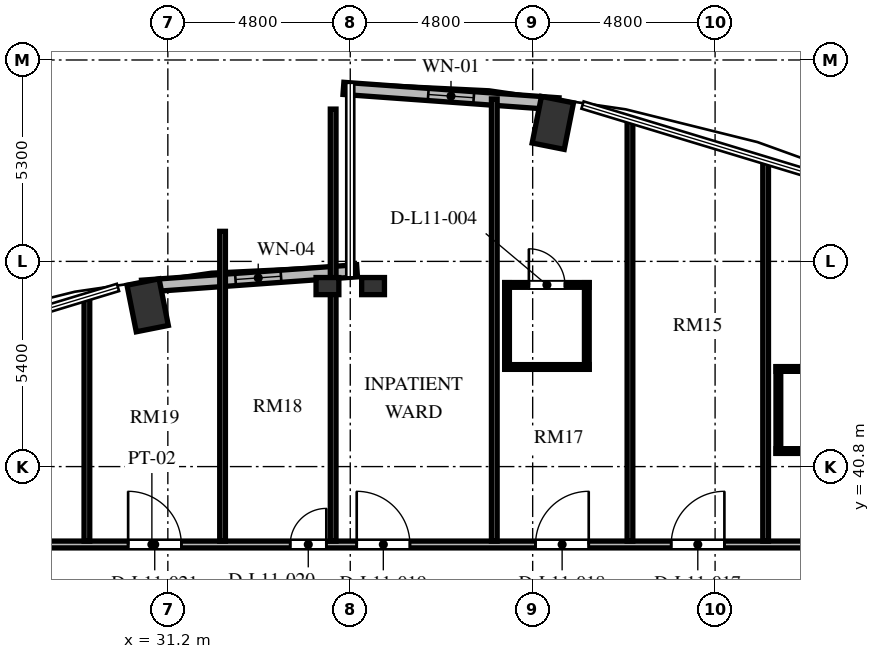
"""IFC4 building model, lengths in metres.
Left out: names, types, materials, properties, quantities, classifications, styles, units other than length and angle.
Written with IfcOpenShell. Run it as: python <this file> out.ifc"""

import sys

from ifc_helpers import new_model, si_unit, direction, frame, frame_2d, origin, origin_2d, place, context, subcontext, project, spatial, rectangle, extrude, element, fill, save


model = new_model("IFC4")
c1 = context("Model", 3, precision=1e-05, world=origin(), true_north=direction((0.0, 1.0)))
c2 = subcontext(c1, "Body", "Model", "MODEL_VIEW")
j1 = project(units=[si_unit("LENGTHUNIT", "METRE"), si_unit("PLANEANGLEUNIT", "RADIAN")], contexts=[c1])
p1 = place(None, origin())
s1 = spatial("IfcSite", under=j1, at=p1, CompositionType="ELEMENT")
p2 = place(p1, origin())
s2 = spatial("IfcBuilding", under=s1, at=p2, CompositionType="ELEMENT")
p3 = place(p2, frame((0.0, 0.0, 47.088)))
s3 = spatial("IfcBuildingStorey", under=s2, at=p3, CompositionType="ELEMENT", Elevation=47.088)
for number, where, z_axis, x_axis in (
    (1, (41.331, 49.844, 0.0), (0.0, 0.0, 1.0), (0.195, 0.981, 0.0)),
    (2, (30.669, 45.044, 0.0), (0.0, 0.0, 1.0), (-0.195, 0.981, 0.0)),
):
    element("IfcColumn", number, at=place(p3, frame(where, z_axis=z_axis, x_axis=x_axis)), inside=s3, PredefinedType="COLUMN", context=c2, shape_type="SweptSolid", body=[
        extrude(rectangle(XDim=1.25, YDim=0.86, at=origin_2d()), origin(), (0.0, 0.0, 1.0), 3.648),
    ])
for number, where, z_axis, x_axis in (
    (3, (35.4, 45.55, 0.0), (0.0, 0.0, 1.0), (1.0, 0.0, 0.0)),
    (4, (36.6, 45.55, 0.0), (0.0, 0.0, 1.0), (1.0, 0.0, 0.0)),
):
    element("IfcColumn", number, at=place(p3, frame(where, z_axis=z_axis, x_axis=x_axis)), inside=s3, PredefinedType="PILASTER", context=c2, shape_type="SweptSolid", body=[
        extrude(rectangle(XDim=0.6, YDim=0.45, at=origin_2d()), origin(), (0.0, 0.0, 1.0), 3.648),
    ])
p4 = place(p3, frame((41.481, 50.346, 0.0), z_axis=(0.0, 0.0, 1.0), x_axis=(-0.997422321809, 0.071754525696, 0.0)))
e5 = element("IfcWall", 5, at=p4, inside=s3, PredefinedType="SOLIDWALL", context=c2, shape_type="SweptSolid", body=[
    extrude(rectangle(XDim=5.675, YDim=0.32, at=frame_2d((2.838, 0.0))), origin(), (0.0, 0.0, 1.0), 3.428),
])
p5 = place(p4, frame((2.238, 0.0, 0.85)))
e6 = element("IfcOpeningElement", 6, at=p5, cuts=e5, PredefinedType="OPENING", context=c2, shape_type="SweptSolid", body=[
    extrude(rectangle(XDim=1.2, YDim=2.2, at=frame_2d((0.6, 1.1))), frame((0.0, 0.17, 0.0), z_axis=(0.0, -1.0, 0.0), x_axis=(1.0, 0.0, 0.0)), (0.0, 0.0, 1.0), 0.34),
])
p6 = place(p3, frame((36.179, 45.953, 0.0), z_axis=(0.0, 0.0, 1.0), x_axis=(-0.997421878774, -0.071760683825, 0.0)))
e7 = element("IfcWall", 7, at=p6, inside=s3, PredefinedType="SOLIDWALL", context=c2, shape_type="SweptSolid", body=[
    extrude(rectangle(XDim=5.675, YDim=0.32, at=frame_2d((2.837, 0.0))), origin(), (0.0, 0.0, 1.0), 3.428),
])
p7 = place(p6, frame((2.007, 0.0, 0.85)))
e8 = element("IfcOpeningElement", 8, at=p7, cuts=e7, PredefinedType="OPENING", context=c2, shape_type="SweptSolid", body=[
    extrude(rectangle(XDim=1.2, YDim=1.8, at=frame_2d((0.6, 0.9))), frame((0.0, 0.17, 0.0), z_axis=(0.0, -1.0, 0.0), x_axis=(1.0, 0.0, 0.0)), (0.0, 0.0, 1.0), 0.34),
])
p8 = place(p3, frame((23.31, 38.75, 0.0), z_axis=(0.0, 0.0, 1.0), x_axis=(1.0, 0.0, 0.0)))
e9 = element("IfcWall", 9, at=p8, inside=s3, PredefinedType="PARTITIONING", context=c2, shape_type="SweptSolid", body=[
    extrude(rectangle(XDim=29.88, YDim=0.18, at=frame_2d((14.94, 0.0))), origin(), (0.0, 0.0, 1.0), 3.053),
])
p9 = place(p8, frame((25.891, 0.0, 0.0)))
e10 = element("IfcOpeningElement", 10, at=p9, cuts=e9, PredefinedType="OPENING", context=c2, shape_type="SweptSolid", body=[
    extrude(rectangle(XDim=1.4, YDim=2.2, at=frame_2d((0.7, 1.1))), frame((0.0, 0.1, 0.0), z_axis=(0.0, -1.0, 0.0), x_axis=(1.0, 0.0, 0.0)), (0.0, 0.0, 1.0), 0.2),
])
p10 = place(p8, frame((21.135, 0.0, 0.0)))
e11 = element("IfcOpeningElement", 11, at=p10, cuts=e9, PredefinedType="OPENING", context=c2, shape_type="SweptSolid", body=[
    extrude(rectangle(XDim=1.4, YDim=2.2, at=frame_2d((0.7, 1.1))), frame((0.0, 0.1, 0.0), z_axis=(0.0, -1.0, 0.0), x_axis=(1.0, 0.0, 0.0)), (0.0, 0.0, 1.0), 0.2),
])
p11 = place(p8, frame((17.565, 0.0, 0.0)))
e12 = element("IfcOpeningElement", 12, at=p11, cuts=e9, PredefinedType="OPENING", context=c2, shape_type="SweptSolid", body=[
    extrude(rectangle(XDim=1.4, YDim=2.2, at=frame_2d((0.7, 1.1))), frame((0.0, 0.1, 0.0), z_axis=(0.0, -1.0, 0.0), x_axis=(1.0, 0.0, 0.0)), (0.0, 0.0, 1.0), 0.2),
])
p12 = place(p8, frame((12.86, 0.0, 0.0)))
e13 = element("IfcOpeningElement", 13, at=p12, cuts=e9, PredefinedType="OPENING", context=c2, shape_type="SweptSolid", body=[
    extrude(rectangle(XDim=1.4, YDim=2.2, at=frame_2d((0.7, 1.1))), frame((0.0, 0.1, 0.0), z_axis=(0.0, -1.0, 0.0), x_axis=(1.0, 0.0, 0.0)), (0.0, 0.0, 1.0), 0.2),
])
p13 = place(p8, frame((11.11, 0.0, 0.0)))
e14 = element("IfcOpeningElement", 14, at=p13, cuts=e9, PredefinedType="OPENING", context=c2, shape_type="SweptSolid", body=[
    extrude(rectangle(XDim=0.95, YDim=2.1, at=frame_2d((0.475, 1.05))), frame((0.0, 0.1, 0.0), z_axis=(0.0, -1.0, 0.0), x_axis=(1.0, 0.0, 0.0)), (0.0, 0.0, 1.0), 0.2),
])
p14 = place(p8, frame((6.845, 0.0, 0.0)))
e15 = element("IfcOpeningElement", 15, at=p14, cuts=e9, PredefinedType="OPENING", context=c2, shape_type="SweptSolid", body=[
    extrude(rectangle(XDim=1.4, YDim=2.2, at=frame_2d((0.7, 1.1))), frame((0.0, 0.1, 0.0), z_axis=(0.0, -1.0, 0.0), x_axis=(1.0, 0.0, 0.0)), (0.0, 0.0, 1.0), 0.2),
])
p15 = place(p8, frame((2.339, 0.0, 0.0)))
e16 = element("IfcOpeningElement", 16, at=p15, cuts=e9, PredefinedType="OPENING", context=c2, shape_type="SweptSolid", body=[
    extrude(rectangle(XDim=1.4, YDim=2.2, at=frame_2d((0.7, 1.1))), frame((0.0, 0.1, 0.0), z_axis=(0.0, -1.0, 0.0), x_axis=(1.0, 0.0, 0.0)), (0.0, 0.0, 1.0), 0.2),
])
p16 = place(p3, frame((29.07, 38.84, 0.0), z_axis=(0.0, 0.0, 1.0), x_axis=(0.0, 1.0, 0.0)))
e17 = element("IfcWall", 17, at=p16, inside=s3, PredefinedType="PARTITIONING", context=c2, shape_type="SweptSolid", body=[
    extrude(rectangle(XDim=6.414, YDim=0.15, at=frame_2d((3.207, 0.0))), origin(), (0.0, 0.0, 1.0), 3.428),
])
p17 = place(p3, frame((32.64, 38.84, 0.0), z_axis=(0.0, 0.0, 1.0), x_axis=(0.0, 1.0, 0.0)))
e18 = element("IfcWall", 18, at=p17, inside=s3, PredefinedType="PARTITIONING", context=c2, shape_type="SweptSolid", body=[
    extrude(rectangle(XDim=8.151, YDim=0.15, at=frame_2d((4.075, 0.0))), origin(), (0.0, 0.0, 1.0), 3.428),
])
p18 = place(p3, frame((35.55, 38.84, 0.0), z_axis=(0.0, 0.0, 1.0), x_axis=(0.0, 1.0, 0.0)))
e19 = element("IfcWall", 19, at=p18, inside=s3, PredefinedType="PARTITIONING", context=c2, shape_type="SweptSolid", body=[
    extrude(rectangle(XDim=11.367, YDim=0.15, at=frame_2d((5.684, 0.0))), origin(), (0.0, 0.0, 1.0), 3.428),
])
p19 = place(p3, frame((39.79, 38.84, 0.0), z_axis=(0.0, 0.0, 1.0), x_axis=(0.0, 1.0, 0.0)))
e20 = element("IfcWall", 20, at=p19, inside=s3, PredefinedType="PARTITIONING", context=c2, shape_type="SweptSolid", body=[
    extrude(rectangle(XDim=11.635, YDim=0.15, at=frame_2d((5.817, 0.0))), origin(), (0.0, 0.0, 1.0), 2.813),
])
p20 = place(p3, frame((43.36, 38.84, 0.0), z_axis=(0.0, 0.0, 1.0), x_axis=(0.0, 1.0, 0.0)))
e21 = element("IfcWall", 21, at=p20, inside=s3, PredefinedType="PARTITIONING", context=c2, shape_type="SweptSolid", body=[
    extrude(rectangle(XDim=11.084, YDim=0.15, at=frame_2d((5.542, 0.0))), origin(), (0.0, 0.0, 1.0), 3.428),
])
p21 = place(p3, frame((46.93, 38.84, 0.0), z_axis=(0.0, 0.0, 1.0), x_axis=(0.0, 1.0, 0.0)))
e22 = element("IfcWall", 22, at=p21, inside=s3, PredefinedType="PARTITIONING", context=c2, shape_type="SweptSolid", body=[
    extrude(rectangle(XDim=10.003, YDim=0.15, at=frame_2d((5.001, 0.0))), origin(), (0.0, 0.0, 1.0), 3.428),
])
p22 = place(p3, frame((47.205, 43.369, 0.0), z_axis=(0.0, 0.0, 1.0), x_axis=(1.0, 0.0, 0.0)))
e23 = element("IfcWall", 23, at=p22, inside=s3, PredefinedType="PARTITIONING", context=c2, shape_type="SweptSolid", body=[
    extrude(rectangle(XDim=2.22, YDim=0.125, at=frame_2d((1.11, 0.0))), origin(), (0.0, 0.0, 1.0), 3.428),
])
p23 = place(p22, frame((0.635, 0.0, 0.0)))
e24 = element("IfcOpeningElement", 24, at=p23, cuts=e23, PredefinedType="OPENING", context=c2, shape_type="SweptSolid", body=[
    extrude(rectangle(XDim=0.95, YDim=2.1, at=frame_2d((0.475, 1.05))), frame((0.0, 0.073, 0.0), z_axis=(0.0, -1.0, 0.0), x_axis=(1.0, 0.0, 0.0)), (0.0, 0.0, 1.0), 0.145),
])
p24 = place(p3, frame((47.205, 41.209, 0.0), z_axis=(0.0, 0.0, 1.0), x_axis=(1.0, 0.0, 0.0)))
e25 = element("IfcWall", 25, at=p24, inside=s3, PredefinedType="PARTITIONING", context=c2, shape_type="SweptSolid", body=[
    extrude(rectangle(XDim=2.22, YDim=0.125, at=frame_2d((1.11, 0.0))), origin(), (0.0, 0.0, 1.0), 3.428),
])
p25 = place(p3, frame((47.265, 41.149, 0.0), z_axis=(0.0, 0.0, 1.0), x_axis=(0.0, 1.0, 0.0)))
e26 = element("IfcWall", 26, at=p25, inside=s3, PredefinedType="PARTITIONING", context=c2, shape_type="SweptSolid", body=[
    extrude(rectangle(XDim=2.28, YDim=0.125, at=frame_2d((1.14, 0.0))), origin(), (0.0, 0.0, 1.0), 3.428),
])
p26 = place(p3, frame((40.065, 45.581, 0.0), z_axis=(0.0, 0.0, 1.0), x_axis=(1.0, 0.0, 0.0)))
e27 = element("IfcWall", 27, at=p26, inside=s3, PredefinedType="PARTITIONING", context=c2, shape_type="SweptSolid", body=[
    extrude(rectangle(XDim=2.22, YDim=0.125, at=frame_2d((1.11, 0.0))), origin(), (0.0, 0.0, 1.0), 3.428),
])
p27 = place(p26, frame((0.635, 0.0, 0.0)))
e28 = element("IfcOpeningElement", 28, at=p27, cuts=e27, PredefinedType="OPENING", context=c2, shape_type="SweptSolid", body=[
    extrude(rectangle(XDim=0.95, YDim=2.1, at=frame_2d((0.475, 1.05))), frame((0.0, 0.073, 0.0), z_axis=(0.0, -1.0, 0.0), x_axis=(1.0, 0.0, 0.0)), (0.0, 0.0, 1.0), 0.145),
])
p28 = place(p3, frame((40.065, 43.421, 0.0), z_axis=(0.0, 0.0, 1.0), x_axis=(1.0, 0.0, 0.0)))
e29 = element("IfcWall", 29, at=p28, inside=s3, PredefinedType="PARTITIONING", context=c2, shape_type="SweptSolid", body=[
    extrude(rectangle(XDim=2.22, YDim=0.125, at=frame_2d((1.11, 0.0))), origin(), (0.0, 0.0, 1.0), 3.428),
])
for number, where, z_axis, x_axis in (
    (30, (42.225, 43.361, 0.0), (0.0, 0.0, 1.0), (0.0, 1.0, 0.0)),
    (31, (40.125, 43.361, 0.0), (0.0, 0.0, 1.0), (0.0, 1.0, 0.0)),
):
    element("IfcWall", number, at=place(p3, frame(where, z_axis=z_axis, x_axis=x_axis)), inside=s3, PredefinedType="PARTITIONING", context=c2, shape_type="SweptSolid", body=[
        extrude(rectangle(XDim=2.28, YDim=0.125, at=frame_2d((1.14, 0.0))), origin(), (0.0, 0.0, 1.0), 3.428),
    ])
p29 = place(p5, origin())
e32 = element("IfcWindow", 32, at=p29, inside=s3, PartitioningType="SINGLE_PANEL", PredefinedType="WINDOW", context=c2, shape_type="SweptSolid", body=[
    extrude(rectangle(XDim=1.2, YDim=2.2, at=frame_2d((0.6, 1.1))), frame((0.0, 0.03, 0.0), z_axis=(0.0, -1.0, 0.0), x_axis=(1.0, 0.0, 0.0)), (0.0, 0.0, 1.0), 0.06),
])
fill(e6, e32)
p30 = place(p7, origin())
e33 = element("IfcWindow", 33, at=p30, inside=s3, PartitioningType="SINGLE_PANEL", PredefinedType="WINDOW", context=c2, shape_type="SweptSolid", body=[
    extrude(rectangle(XDim=1.2, YDim=1.8, at=frame_2d((0.6, 0.9))), frame((0.0, 0.03, 0.0), z_axis=(0.0, -1.0, 0.0), x_axis=(1.0, 0.0, 0.0)), (0.0, 0.0, 1.0), 0.06),
])
fill(e8, e33)
p31 = place(p23, origin())
e34 = element("IfcDoor", 34, at=p31, inside=s3, OperationType="SINGLE_SWING_RIGHT", PredefinedType="DOOR", context=c2, shape_type="SweptSolid", body=[
    extrude(rectangle(XDim=0.95, YDim=2.1, at=frame_2d((0.475, 1.05))), frame((0.0, 0.025, 0.0), z_axis=(0.0, -1.0, 0.0), x_axis=(1.0, 0.0, 0.0)), (0.0, 0.0, 1.0), 0.05),
])
fill(e24, e34)
p32 = place(p10, origin())
e35 = element("IfcDoor", 35, at=p32, inside=s3, OperationType="SINGLE_SWING_RIGHT", PredefinedType="DOOR", context=c2, shape_type="SweptSolid", body=[
    extrude(rectangle(XDim=1.4, YDim=2.2, at=frame_2d((0.7, 1.1))), frame((0.0, 0.025, 0.0), z_axis=(0.0, -1.0, 0.0), x_axis=(1.0, 0.0, 0.0)), (0.0, 0.0, 1.0), 0.05),
])
fill(e11, e35)
p33 = place(p27, origin())
e36 = element("IfcDoor", 36, at=p33, inside=s3, OperationType="SINGLE_SWING_LEFT", PredefinedType="DOOR", context=c2, shape_type="SweptSolid", body=[
    extrude(rectangle(XDim=0.95, YDim=2.1, at=frame_2d((0.475, 1.05))), frame((0.0, 0.025, 0.0), z_axis=(0.0, -1.0, 0.0), x_axis=(1.0, 0.0, 0.0)), (0.0, 0.0, 1.0), 0.05),
])
fill(e28, e36)
p34 = place(p11, origin())
e37 = element("IfcDoor", 37, at=p34, inside=s3, OperationType="SINGLE_SWING_RIGHT", PredefinedType="DOOR", context=c2, shape_type="SweptSolid", body=[
    extrude(rectangle(XDim=1.4, YDim=2.2, at=frame_2d((0.7, 1.1))), frame((0.0, 0.025, 0.0), z_axis=(0.0, -1.0, 0.0), x_axis=(1.0, 0.0, 0.0)), (0.0, 0.0, 1.0), 0.05),
])
fill(e12, e37)
p35 = place(p12, origin())
e38 = element("IfcDoor", 38, at=p35, inside=s3, OperationType="SINGLE_SWING_LEFT", PredefinedType="DOOR", context=c2, shape_type="SweptSolid", body=[
    extrude(rectangle(XDim=1.4, YDim=2.2, at=frame_2d((0.7, 1.1))), frame((0.0, 0.025, 0.0), z_axis=(0.0, -1.0, 0.0), x_axis=(1.0, 0.0, 0.0)), (0.0, 0.0, 1.0), 0.05),
])
fill(e13, e38)
p36 = place(p13, origin())
e39 = element("IfcDoor", 39, at=p36, inside=s3, OperationType="SINGLE_SWING_RIGHT", PredefinedType="DOOR", context=c2, shape_type="SweptSolid", body=[
    extrude(rectangle(XDim=0.95, YDim=2.1, at=frame_2d((0.475, 1.05))), frame((0.0, 0.025, 0.0), z_axis=(0.0, -1.0, 0.0), x_axis=(1.0, 0.0, 0.0)), (0.0, 0.0, 1.0), 0.05),
])
fill(e14, e39)
p37 = place(p14, origin())
e40 = element("IfcDoor", 40, at=p37, inside=s3, OperationType="SINGLE_SWING_LEFT", PredefinedType="DOOR", context=c2, shape_type="SweptSolid", body=[
    extrude(rectangle(XDim=1.4, YDim=2.2, at=frame_2d((0.7, 1.1))), frame((0.0, 0.025, 0.0), z_axis=(0.0, -1.0, 0.0), x_axis=(1.0, 0.0, 0.0)), (0.0, 0.0, 1.0), 0.05),
])
fill(e15, e40)
save(model, sys.argv[1])
